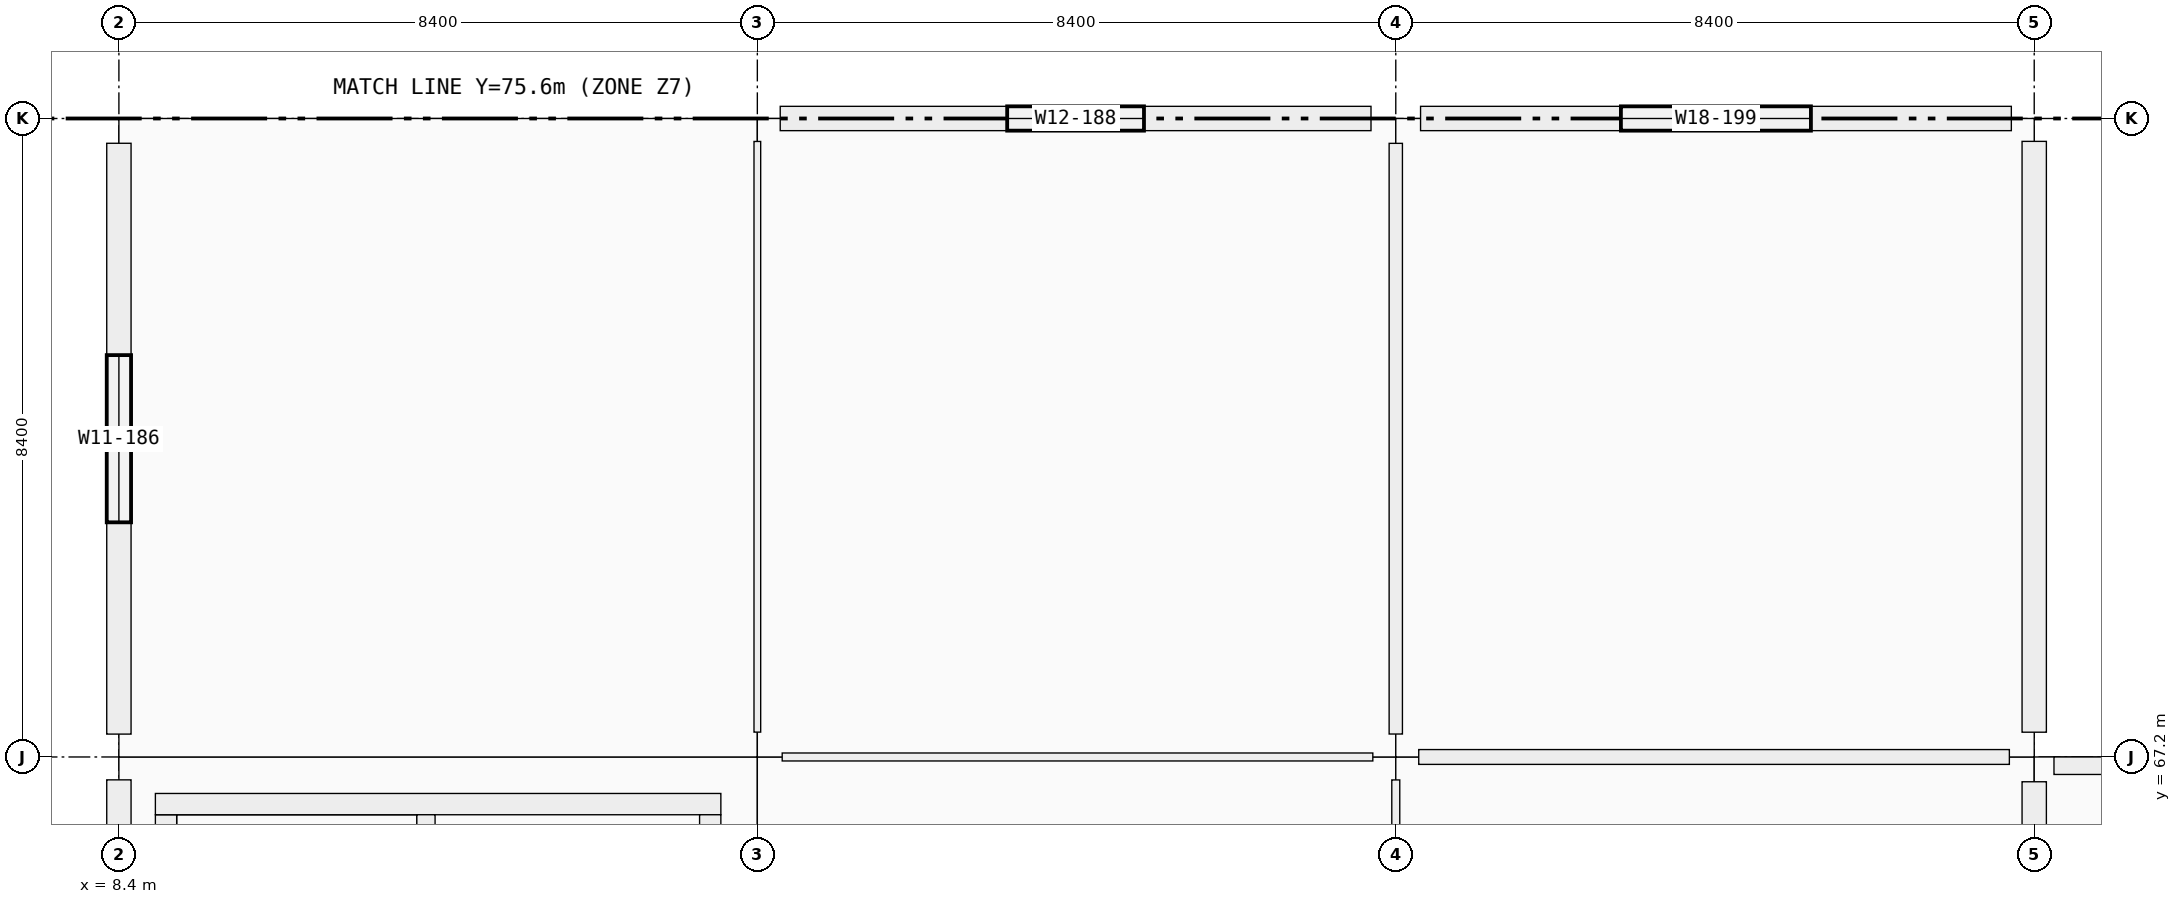
"""IFC4 building model, lengths in metres.
Left out: names, types, materials, properties, quantities, classifications, styles, units other than length and angle.
Written with IfcOpenShell. Run it as: python <this file> out.ifc"""

import sys

from ifc_helpers import new_model, si_unit, direction, frame, frame_2d, origin, origin_2d, place, context, subcontext, project, spatial, rectangle, extrude, element, fill, save


model = new_model("IFC4")
c1 = context("Model", 3, precision=1e-05, world=origin(), true_north=direction((0.0, 1.0)))
c2 = subcontext(c1, "Body", "Model", "MODEL_VIEW")
j1 = project(units=[si_unit("LENGTHUNIT", "METRE"), si_unit("PLANEANGLEUNIT", "RADIAN")], contexts=[c1])
p1 = place(None, origin())
s1 = spatial("IfcSite", under=j1, at=p1, CompositionType="ELEMENT")
p2 = place(p1, origin())
s2 = spatial("IfcBuilding", under=s1, at=p2, CompositionType="ELEMENT")
p3 = place(p2, frame((0.0, 0.0, 14.76)))
s3 = spatial("IfcBuildingStorey", under=s2, at=p3, CompositionType="ELEMENT", Elevation=14.76)
p4 = place(p3, frame((8.4, 67.2, 0.0), z_axis=(0.0, 0.0, 1.0), x_axis=(1.0, 0.0, 0.0)))
e1 = element("IfcColumn", 1, at=p4, inside=s3, PredefinedType="COLUMN", context=c2, shape_type="SweptSolid", body=[
    extrude(rectangle(XDim=0.6, YDim=0.6, at=origin_2d()), origin(), (0.0, 0.0, 1.0), 4.32),
])
for number, where, z_axis, x_axis in (
    (2, (8.4, 75.6, 0.0), (0.0, 0.0, 1.0), (1.0, 0.0, 0.0)),
    (3, (16.8, 67.2, 0.0), (0.0, 0.0, 1.0), (1.0, 0.0, 0.0)),
):
    element("IfcColumn", number, at=place(p3, frame(where, z_axis=z_axis, x_axis=x_axis)), inside=s3, PredefinedType="COLUMN", context=c2, shape_type="SweptSolid", body=[
        extrude(rectangle(XDim=0.65, YDim=0.65, at=origin_2d()), origin(), (0.0, 0.0, 1.0), 4.32),
    ])
for number, where, z_axis, x_axis in (
    (4, (16.8, 75.6, 0.0), (0.0, 0.0, 1.0), (1.0, 0.0, 0.0)),
    (5, (25.2, 67.2, 0.0), (0.0, 0.0, 1.0), (1.0, 0.0, 0.0)),
):
    element("IfcColumn", number, at=place(p3, frame(where, z_axis=z_axis, x_axis=x_axis)), inside=s3, PredefinedType="COLUMN", context=c2, shape_type="SweptSolid", body=[
        extrude(rectangle(XDim=0.6, YDim=0.6, at=origin_2d()), origin(), (0.0, 0.0, 1.0), 4.32),
    ])
for number, where, z_axis, x_axis in (
    (6, (25.2, 75.6, 0.0), (0.0, 0.0, 1.0), (1.0, 0.0, 0.0)),
    (7, (33.6, 67.2, 0.0), (0.0, 0.0, 1.0), (1.0, 0.0, 0.0)),
):
    element("IfcColumn", number, at=place(p3, frame(where, z_axis=z_axis, x_axis=x_axis)), inside=s3, PredefinedType="COLUMN", context=c2, shape_type="SweptSolid", body=[
        extrude(rectangle(XDim=0.65, YDim=0.65, at=origin_2d()), origin(), (0.0, 0.0, 1.0), 4.32),
    ])
p5 = place(p3, frame((33.6, 75.6, 0.0), z_axis=(0.0, 0.0, 1.0), x_axis=(1.0, 0.0, 0.0)))
e8 = element("IfcColumn", 8, at=p5, inside=s3, PredefinedType="COLUMN", context=c2, shape_type="SweptSolid", body=[
    extrude(rectangle(XDim=0.6, YDim=0.6, at=origin_2d()), origin(), (0.0, 0.0, 1.0), 4.32),
])
p6 = place(p3, frame((8.4, 59.126, 0.0), z_axis=(0.0, 0.0, 1.0), x_axis=(0.0, 1.0, 0.0)))
e9 = element("IfcWall", 9, at=p6, inside=s3, PredefinedType="SOLIDWALL", context=c2, shape_type="SweptSolid", body=[
    extrude(rectangle(XDim=7.773, YDim=0.32, at=frame_2d((3.886, 0.0))), origin(), (0.0, 0.0, 1.0), 3.37),
])
p7 = place(p3, frame((8.4, 67.501, 0.0), z_axis=(0.0, 0.0, 1.0), x_axis=(0.0, 1.0, 0.0)))
e10 = element("IfcWall", 10, at=p7, inside=s3, PredefinedType="SOLIDWALL", context=c2, shape_type="SweptSolid", body=[
    extrude(rectangle(XDim=7.773, YDim=0.32, at=frame_2d((3.886, 0.0))), origin(), (0.0, 0.0, 1.0), 3.37),
])
p8 = place(p7, frame((2.786, 0.0, 0.9)))
e11 = element("IfcOpeningElement", 11, at=p8, cuts=e10, PredefinedType="OPENING", context=c2, shape_type="SweptSolid", body=[
    extrude(rectangle(XDim=2.2, YDim=1.35, at=frame_2d((1.1, 0.675))), frame((0.0, 0.16, 0.0), z_axis=(0.0, -1.0, 0.0), x_axis=(1.0, 0.0, 0.0)), (0.0, 0.0, 1.0), 0.32),
])
p9 = place(p3, frame((17.101, 75.6, 0.0), z_axis=(0.0, 0.0, 1.0), x_axis=(1.0, 0.0, 0.0)))
e12 = element("IfcWall", 12, at=p9, inside=s3, PredefinedType="SOLIDWALL", context=c2, shape_type="SweptSolid", body=[
    extrude(rectangle(XDim=7.773, YDim=0.32, at=frame_2d((3.886, 0.0))), origin(), (0.0, 0.0, 1.0), 3.37),
])
p10 = place(p9, frame((2.986, 0.0, 0.9)))
e13 = element("IfcOpeningElement", 13, at=p10, cuts=e12, PredefinedType="OPENING", context=c2, shape_type="SweptSolid", body=[
    extrude(rectangle(XDim=1.8, YDim=1.35, at=frame_2d((0.9, 0.675))), frame((0.0, 0.16, 0.0), z_axis=(0.0, -1.0, 0.0), x_axis=(1.0, 0.0, 0.0)), (0.0, 0.0, 1.0), 0.32),
])
p11 = place(p3, frame((33.6, 66.874, 0.0), z_axis=(0.0, 0.0, 1.0), x_axis=(0.0, -1.0, 0.0)))
e14 = element("IfcWall", 14, at=p11, inside=s3, PredefinedType="SOLIDWALL", context=c2, shape_type="SweptSolid", body=[
    extrude(rectangle(XDim=7.773, YDim=0.32, at=frame_2d((3.886, 0.0))), origin(), (0.0, 0.0, 1.0), 3.37),
])
p12 = place(p11, frame((2.286, 0.0, 0.9)))
e15 = element("IfcOpeningElement", 15, at=p12, cuts=e14, PredefinedType="OPENING", context=c2, shape_type="SweptSolid", body=[
    extrude(rectangle(XDim=3.2, YDim=1.75, at=frame_2d((1.6, 0.875))), frame((0.0, 0.16, 0.0), z_axis=(0.0, -1.0, 0.0), x_axis=(1.0, 0.0, 0.0)), (0.0, 0.0, 1.0), 0.32),
])
p13 = place(p3, frame((25.526, 75.6, 0.0), z_axis=(0.0, 0.0, 1.0), x_axis=(1.0, 0.0, 0.0)))
e16 = element("IfcWall", 16, at=p13, inside=s3, PredefinedType="SOLIDWALL", context=c2, shape_type="SweptSolid", body=[
    extrude(rectangle(XDim=7.773, YDim=0.32, at=frame_2d((3.887, 0.0))), origin(), (0.0, 0.0, 1.0), 3.37),
])
p14 = place(p13, frame((2.636, 0.0, 0.9)))
e17 = element("IfcOpeningElement", 17, at=p14, cuts=e16, PredefinedType="OPENING", context=c2, shape_type="SweptSolid", body=[
    extrude(rectangle(XDim=2.5, YDim=1.65, at=frame_2d((1.25, 0.825))), frame((0.0, 0.16, 0.0), z_axis=(0.0, -1.0, 0.0), x_axis=(1.0, 0.0, 0.0)), (0.0, 0.0, 1.0), 0.32),
])
p15 = place(p3, frame((33.6, 75.299, 0.0), z_axis=(0.0, 0.0, 1.0), x_axis=(0.0, -1.0, 0.0)))
e18 = element("IfcWall", 18, at=p15, inside=s3, PredefinedType="SOLIDWALL", context=c2, shape_type="SweptSolid", body=[
    extrude(rectangle(XDim=7.773, YDim=0.32, at=frame_2d((3.887, 0.0))), origin(), (0.0, 0.0, 1.0), 3.37),
])
p16 = place(p3, frame((33.86, 67.085, 0.0), z_axis=(0.0, 0.0, 1.0), x_axis=(1.0, 0.0, 0.0)))
e19 = element("IfcWall", 19, at=p16, inside=s3, PredefinedType="PARAPET", context=c2, shape_type="SweptSolid", body=[
    extrude(rectangle(XDim=7.88, YDim=0.23, at=frame_2d((3.94, 0.0))), origin(), (0.0, 0.0, 1.0), 0.95),
])
p17 = place(p3, frame((9.02, 59.56, 0.0), z_axis=(0.0, 0.0, 1.0), x_axis=(0.0, 1.0, 0.0)))
e20 = element("IfcWall", 20, at=p17, inside=s3, PredefinedType="SHEAR", context=c2, shape_type="SweptSolid", body=[
    extrude(rectangle(XDim=6.88, YDim=0.28, at=frame_2d((3.44, 0.0))), origin(), (0.0, 0.0, 1.0), 4.32),
])
p18 = place(p3, frame((8.88, 66.58, 0.0), z_axis=(0.0, 0.0, 1.0), x_axis=(1.0, 0.0, 0.0)))
e21 = element("IfcWall", 21, at=p18, inside=s3, PredefinedType="SHEAR", context=c2, shape_type="SweptSolid", body=[
    extrude(rectangle(XDim=7.44, YDim=0.28, at=frame_2d((3.72, 0.0))), origin(), (0.0, 0.0, 1.0), 4.32),
])
p19 = place(p3, frame((16.18, 66.44, 0.0), z_axis=(0.0, 0.0, 1.0), x_axis=(0.0, -1.0, 0.0)))
e22 = element("IfcWall", 22, at=p19, inside=s3, PredefinedType="SHEAR", context=c2, shape_type="SweptSolid", body=[
    extrude(rectangle(XDim=6.88, YDim=0.28, at=frame_2d((3.44, 0.0))), origin(), (0.0, 0.0, 1.0), 4.32),
])
p20 = place(p3, frame((12.44, 59.56, 0.0), z_axis=(0.0, 0.0, 1.0), x_axis=(0.0, 1.0, 0.0)))
e23 = element("IfcWall", 23, at=p20, inside=s3, PredefinedType="SHEAR", context=c2, shape_type="SweptSolid", body=[
    extrude(rectangle(XDim=6.88, YDim=0.24, at=frame_2d((3.44, 0.0))), origin(), (0.0, 0.0, 1.0), 4.32),
])
p21 = place(p20, frame((0.12, 0.0, 0.0)))
e24 = element("IfcOpeningElement", 24, at=p21, cuts=e23, PredefinedType="OPENING", context=c2, shape_type="SweptSolid", body=[
    extrude(rectangle(XDim=1.0, YDim=2.15, at=frame_2d((0.5, 1.075))), frame((0.0, 0.12, 0.0), z_axis=(0.0, -1.0, 0.0), x_axis=(1.0, 0.0, 0.0)), (0.0, 0.0, 1.0), 0.24),
])
p22 = place(p3, frame((17.127, 67.2, 0.0), z_axis=(0.0, 0.0, 1.0), x_axis=(1.0, 0.0, 0.0)))
e25 = element("IfcWall", 25, at=p22, inside=s3, PredefinedType="PARTITIONING", context=c2, shape_type="SweptSolid", body=[
    extrude(rectangle(XDim=7.771, YDim=0.105, at=frame_2d((3.885, 0.0))), origin(), (0.0, 0.0, 1.0), 3.19),
])
p23 = place(p22, frame((3.356, 0.0, 0.0)))
e26 = element("IfcOpeningElement", 26, at=p23, cuts=e25, PredefinedType="OPENING", context=c2, shape_type="SweptSolid", body=[
    extrude(rectangle(XDim=1.06, YDim=2.25, at=frame_2d((0.53, 1.125))), frame((0.0, 0.052, 0.0), z_axis=(0.0, -1.0, 0.0), x_axis=(1.0, 0.0, 0.0)), (0.0, 0.0, 1.0), 0.105),
])
p24 = place(p3, frame((25.502, 67.2, 0.0), z_axis=(0.0, 0.0, 1.0), x_axis=(1.0, 0.0, 0.0)))
e27 = element("IfcWall", 27, at=p24, inside=s3, PredefinedType="PARTITIONING", context=c2, shape_type="SweptSolid", body=[
    extrude(rectangle(XDim=7.771, YDim=0.195, at=frame_2d((3.885, 0.0))), origin(), (0.0, 0.0, 1.0), 3.19),
])
p25 = place(p24, frame((3.401, 0.0, 0.0)))
e28 = element("IfcOpeningElement", 28, at=p25, cuts=e27, PredefinedType="OPENING", context=c2, shape_type="SweptSolid", body=[
    extrude(rectangle(XDim=0.97, YDim=2.12, at=frame_2d((0.485, 1.06))), frame((0.0, 0.098, 0.0), z_axis=(0.0, -1.0, 0.0), x_axis=(1.0, 0.0, 0.0)), (0.0, 0.0, 1.0), 0.195),
])
p26 = place(p3, frame((16.8, 67.527, 0.0), z_axis=(0.0, 0.0, 1.0), x_axis=(0.0, 1.0, 0.0)))
e29 = element("IfcWall", 29, at=p26, inside=s3, PredefinedType="PARTITIONING", context=c2, shape_type="SweptSolid", body=[
    extrude(rectangle(XDim=7.771, YDim=0.088, at=frame_2d((3.885, 0.0))), origin(), (0.0, 0.0, 1.0), 3.19),
])
p27 = place(p26, frame((3.356, 0.0, 0.0)))
e30 = element("IfcOpeningElement", 30, at=p27, cuts=e29, PredefinedType="OPENING", context=c2, shape_type="SweptSolid", body=[
    extrude(rectangle(XDim=1.06, YDim=2.25, at=frame_2d((0.53, 1.125))), frame((0.0, 0.044, 0.0), z_axis=(0.0, -1.0, 0.0), x_axis=(1.0, 0.0, 0.0)), (0.0, 0.0, 1.0), 0.088),
])
p28 = place(p3, frame((25.2, 59.127, 0.0), z_axis=(0.0, 0.0, 1.0), x_axis=(0.0, 1.0, 0.0)))
e31 = element("IfcWall", 31, at=p28, inside=s3, PredefinedType="PARTITIONING", context=c2, shape_type="SweptSolid", body=[
    extrude(rectangle(XDim=7.771, YDim=0.105, at=frame_2d((3.885, 0.0))), origin(), (0.0, 0.0, 1.0), 3.19),
])
p29 = place(p28, frame((3.396, 0.0, 0.0)))
e32 = element("IfcOpeningElement", 32, at=p29, cuts=e31, PredefinedType="OPENING", context=c2, shape_type="SweptSolid", body=[
    extrude(rectangle(XDim=0.98, YDim=2.18, at=frame_2d((0.49, 1.09))), frame((0.0, 0.052, 0.0), z_axis=(0.0, -1.0, 0.0), x_axis=(1.0, 0.0, 0.0)), (0.0, 0.0, 1.0), 0.105),
])
p30 = place(p3, frame((25.2, 67.502, 0.0), z_axis=(0.0, 0.0, 1.0), x_axis=(0.0, 1.0, 0.0)))
e33 = element("IfcWall", 33, at=p30, inside=s3, PredefinedType="PARTITIONING", context=c2, shape_type="SweptSolid", body=[
    extrude(rectangle(XDim=7.771, YDim=0.175, at=frame_2d((3.885, 0.0))), origin(), (0.0, 0.0, 1.0), 3.19),
])
p31 = place(p30, frame((3.356, 0.0, 0.0)))
e34 = element("IfcOpeningElement", 34, at=p31, cuts=e33, PredefinedType="OPENING", context=c2, shape_type="SweptSolid", body=[
    extrude(rectangle(XDim=1.06, YDim=2.25, at=frame_2d((0.53, 1.125))), frame((0.0, 0.087, 0.0), z_axis=(0.0, -1.0, 0.0), x_axis=(1.0, 0.0, 0.0)), (0.0, 0.0, 1.0), 0.175),
])
p32 = place(p8, origin())
e35 = element("IfcWindow", 35, at=p32, inside=s3, PartitioningType="SINGLE_PANEL", PredefinedType="WINDOW", context=c2, shape_type="SweptSolid", body=[
    extrude(rectangle(XDim=2.2, YDim=1.35, at=frame_2d((1.1, 0.675))), frame((0.0, 0.03, 0.0), z_axis=(0.0, -1.0, 0.0), x_axis=(1.0, 0.0, 0.0)), (0.0, 0.0, 1.0), 0.06),
])
fill(e11, e35)
p33 = place(p10, origin())
e36 = element("IfcWindow", 36, at=p33, inside=s3, PartitioningType="SINGLE_PANEL", PredefinedType="WINDOW", context=c2, shape_type="SweptSolid", body=[
    extrude(rectangle(XDim=1.8, YDim=1.35, at=frame_2d((0.9, 0.675))), frame((0.0, 0.03, 0.0), z_axis=(0.0, -1.0, 0.0), x_axis=(1.0, 0.0, 0.0)), (0.0, 0.0, 1.0), 0.06),
])
fill(e13, e36)
p34 = place(p14, origin())
e37 = element("IfcWindow", 37, at=p34, inside=s3, PartitioningType="SINGLE_PANEL", PredefinedType="WINDOW", context=c2, shape_type="SweptSolid", body=[
    extrude(rectangle(XDim=2.5, YDim=1.65, at=frame_2d((1.25, 0.825))), frame((0.0, 0.03, 0.0), z_axis=(0.0, -1.0, 0.0), x_axis=(1.0, 0.0, 0.0)), (0.0, 0.0, 1.0), 0.06),
])
fill(e17, e37)
p35 = place(p23, origin())
e38 = element("IfcDoor", 38, at=p35, inside=s3, OperationType="SINGLE_SWING_LEFT", PredefinedType="DOOR", context=c2, shape_type="SweptSolid", body=[
    extrude(rectangle(XDim=1.06, YDim=2.25, at=frame_2d((0.53, 1.125))), frame((0.0, 0.025, 0.0), z_axis=(0.0, -1.0, 0.0), x_axis=(1.0, 0.0, 0.0)), (0.0, 0.0, 1.0), 0.05),
])
fill(e26, e38)
p36 = place(p25, origin())
e39 = element("IfcDoor", 39, at=p36, inside=s3, OperationType="SINGLE_SWING_RIGHT", PredefinedType="DOOR", context=c2, shape_type="SweptSolid", body=[
    extrude(rectangle(XDim=0.97, YDim=2.12, at=frame_2d((0.485, 1.06))), frame((0.0, 0.025, 0.0), z_axis=(0.0, -1.0, 0.0), x_axis=(1.0, 0.0, 0.0)), (0.0, 0.0, 1.0), 0.05),
])
fill(e28, e39)
p37 = place(p27, origin())
e40 = element("IfcDoor", 40, at=p37, inside=s3, OperationType="SINGLE_SWING_LEFT", PredefinedType="DOOR", context=c2, shape_type="SweptSolid", body=[
    extrude(rectangle(XDim=1.06, YDim=2.25, at=frame_2d((0.53, 1.125))), frame((0.0, 0.025, 0.0), z_axis=(0.0, -1.0, 0.0), x_axis=(1.0, 0.0, 0.0)), (0.0, 0.0, 1.0), 0.05),
])
fill(e30, e40)
p38 = place(p31, origin())
e41 = element("IfcDoor", 41, at=p38, inside=s3, OperationType="SINGLE_SWING_RIGHT", PredefinedType="DOOR", context=c2, shape_type="SweptSolid", body=[
    extrude(rectangle(XDim=1.06, YDim=2.25, at=frame_2d((0.53, 1.125))), frame((0.0, 0.025, 0.0), z_axis=(0.0, -1.0, 0.0), x_axis=(1.0, 0.0, 0.0)), (0.0, 0.0, 1.0), 0.05),
])
fill(e34, e41)
save(model, sys.argv[1])
